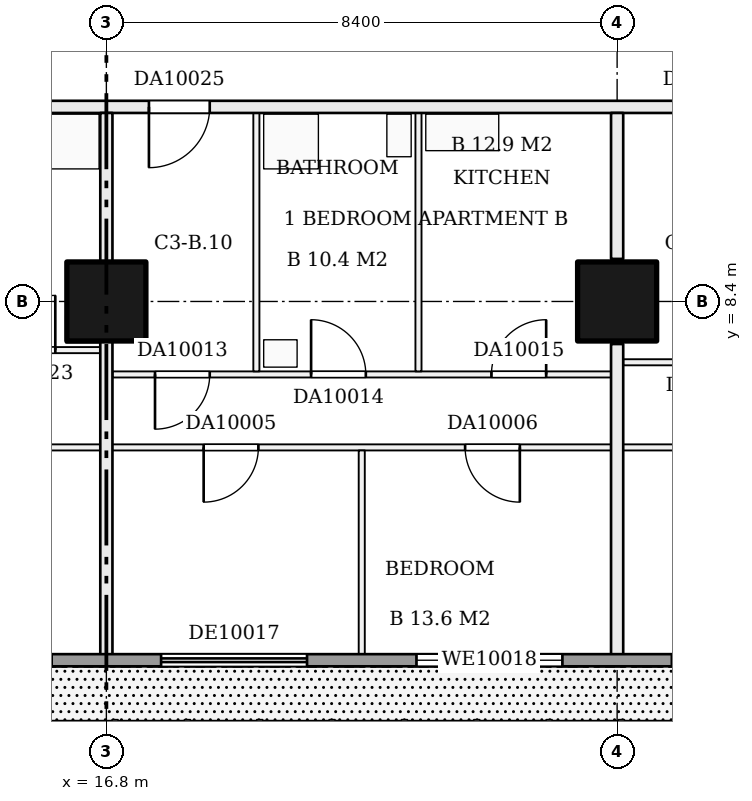
"""IFC4 building model, lengths in metres.
Left out: names, types, materials, properties, quantities, classifications, styles, units other than length and angle.
Written with IfcOpenShell. Run it as: python <this file> out.ifc"""

import sys

from ifc_helpers import new_model, si_unit, direction, frame, frame_2d, origin, origin_2d, place, context, subcontext, project, spatial, rectangle, extrude, element, fill, save


model = new_model("IFC4")
c1 = context("Model", 3, precision=1e-05, world=origin(), true_north=direction((0.0, 1.0)))
c2 = subcontext(c1, "Body", "Model", "MODEL_VIEW")
j1 = project(units=[si_unit("LENGTHUNIT", "METRE"), si_unit("PLANEANGLEUNIT", "RADIAN")], contexts=[c1])
p1 = place(None, origin())
s1 = spatial("IfcSite", under=j1, at=p1, CompositionType="ELEMENT")
p2 = place(p1, origin())
s2 = spatial("IfcBuilding", under=s1, at=p2, CompositionType="ELEMENT")
p3 = place(p2, frame((0.0, 0.0, 46.2)))
s3 = spatial("IfcBuildingStorey", under=s2, at=p3, CompositionType="ELEMENT", Elevation=46.2)
for number, where, z_axis, x_axis in (
    (1, (16.8, 8.4, 0.0), (0.0, 0.0, 1.0), (1.0, 0.0, 0.0)),
    (2, (25.2, 8.4, 0.0), (0.0, 0.0, 1.0), (1.0, 0.0, 0.0)),
):
    element("IfcColumn", number, at=place(p3, frame(where, z_axis=z_axis, x_axis=x_axis)), inside=s3, PredefinedType="COLUMN", context=c2, shape_type="SweptSolid", body=[
        extrude(rectangle(XDim=1.3, YDim=1.3, at=origin_2d()), origin(), (0.0, 0.0, 1.0), 3.22),
    ])
p4 = place(p3, frame((12.65, 6.0, 0.0), z_axis=(0.0, 0.0, 1.0), x_axis=(1.0, 0.0, 0.0)))
e3 = element("IfcWall", 3, at=p4, inside=s3, PredefinedType="PARTITIONING", context=c2, shape_type="SweptSolid", body=[
    extrude(rectangle(XDim=25.05, YDim=0.1, at=frame_2d((12.525, 0.0))), origin(), (0.0, 0.0, 1.0), 3.22),
])
p5 = place(p4, frame((1.65, 0.0, 0.0)))
e4 = element("IfcOpeningElement", 4, at=p5, cuts=e3, PredefinedType="OPENING", context=c2, shape_type="SweptSolid", body=[
    extrude(rectangle(XDim=0.9, YDim=2.1, at=frame_2d((0.45, 1.05))), frame((0.0, 0.06, 0.0), z_axis=(0.0, -1.0, 0.0), x_axis=(1.0, 0.0, 0.0)), (0.0, 0.0, 1.0), 0.12),
])
p6 = place(p4, frame((5.75, 0.0, 0.0)))
e5 = element("IfcOpeningElement", 5, at=p6, cuts=e3, PredefinedType="OPENING", context=c2, shape_type="SweptSolid", body=[
    extrude(rectangle(XDim=0.9, YDim=2.1, at=frame_2d((0.45, 1.05))), frame((0.0, 0.06, 0.0), z_axis=(0.0, -1.0, 0.0), x_axis=(1.0, 0.0, 0.0)), (0.0, 0.0, 1.0), 0.12),
])
p7 = place(p4, frame((10.05, 0.0, 0.0)))
e6 = element("IfcOpeningElement", 6, at=p7, cuts=e3, PredefinedType="OPENING", context=c2, shape_type="SweptSolid", body=[
    extrude(rectangle(XDim=0.9, YDim=2.1, at=frame_2d((0.45, 1.05))), frame((0.0, 0.06, 0.0), z_axis=(0.0, -1.0, 0.0), x_axis=(1.0, 0.0, 0.0)), (0.0, 0.0, 1.0), 0.12),
])
p8 = place(p4, frame((14.15, 0.0, 0.0)))
e7 = element("IfcOpeningElement", 7, at=p8, cuts=e3, PredefinedType="OPENING", context=c2, shape_type="SweptSolid", body=[
    extrude(rectangle(XDim=0.9, YDim=2.1, at=frame_2d((0.45, 1.05))), frame((0.0, 0.06, 0.0), z_axis=(0.0, -1.0, 0.0), x_axis=(1.0, 0.0, 0.0)), (0.0, 0.0, 1.0), 0.12),
])
p9 = place(p4, frame((20.45, 0.0, 0.0)))
e8 = element("IfcOpeningElement", 8, at=p9, cuts=e3, PredefinedType="OPENING", context=c2, shape_type="SweptSolid", body=[
    extrude(rectangle(XDim=0.9, YDim=2.1, at=frame_2d((0.45, 1.05))), frame((0.0, 0.06, 0.0), z_axis=(0.0, -1.0, 0.0), x_axis=(1.0, 0.0, 0.0)), (0.0, 0.0, 1.0), 0.12),
])
p10 = place(p3, frame((16.9, 7.2, 0.0), z_axis=(0.0, 0.0, 1.0), x_axis=(1.0, 0.0, 0.0)))
e9 = element("IfcWall", 9, at=p10, inside=s3, PredefinedType="PARTITIONING", context=c2, shape_type="SweptSolid", body=[
    extrude(rectangle(XDim=8.2, YDim=0.1, at=frame_2d((4.1, 0.0))), origin(), (0.0, 0.0, 1.0), 3.22),
])
p11 = place(p10, frame((0.7, 0.0, 0.0)))
e10 = element("IfcOpeningElement", 10, at=p11, cuts=e9, PredefinedType="OPENING", context=c2, shape_type="SweptSolid", body=[
    extrude(rectangle(XDim=0.9, YDim=2.1, at=frame_2d((0.45, 1.05))), frame((0.0, 0.06, 0.0), z_axis=(0.0, -1.0, 0.0), x_axis=(1.0, 0.0, 0.0)), (0.0, 0.0, 1.0), 0.12),
])
p12 = place(p10, frame((3.267, 0.0, 0.0)))
e11 = element("IfcOpeningElement", 11, at=p12, cuts=e9, PredefinedType="OPENING", context=c2, shape_type="SweptSolid", body=[
    extrude(rectangle(XDim=0.9, YDim=2.1, at=frame_2d((0.45, 1.05))), frame((0.0, 0.06, 0.0), z_axis=(0.0, -1.0, 0.0), x_axis=(1.0, 0.0, 0.0)), (0.0, 0.0, 1.0), 0.12),
])
p13 = place(p10, frame((6.233, 0.0, 0.0)))
e12 = element("IfcOpeningElement", 12, at=p13, cuts=e9, PredefinedType="OPENING", context=c2, shape_type="SweptSolid", body=[
    extrude(rectangle(XDim=0.9, YDim=2.1, at=frame_2d((0.45, 1.05))), frame((0.0, 0.06, 0.0), z_axis=(0.0, -1.0, 0.0), x_axis=(1.0, 0.0, 0.0)), (0.0, 0.0, 1.0), 0.12),
])
p14 = place(p3, frame((25.3, 7.4, 0.0), z_axis=(0.0, 0.0, 1.0), x_axis=(1.0, 0.0, 0.0)))
e13 = element("IfcWall", 13, at=p14, inside=s3, PredefinedType="PARTITIONING", context=c2, shape_type="SweptSolid", body=[
    extrude(rectangle(XDim=12.4, YDim=0.1, at=frame_2d((6.2, 0.0))), origin(), (0.0, 0.0, 1.0), 3.22),
])
p15 = place(p14, frame((1.0, 0.0, 0.0)))
e14 = element("IfcOpeningElement", 14, at=p15, cuts=e13, PredefinedType="OPENING", context=c2, shape_type="SweptSolid", body=[
    extrude(rectangle(XDim=0.9, YDim=2.1, at=frame_2d((0.45, 1.05))), frame((0.0, 0.06, 0.0), z_axis=(0.0, -1.0, 0.0), x_axis=(1.0, 0.0, 0.0)), (0.0, 0.0, 1.0), 0.12),
])
p16 = place(p14, frame((3.8, 0.0, 0.0)))
e15 = element("IfcOpeningElement", 15, at=p16, cuts=e13, PredefinedType="OPENING", context=c2, shape_type="SweptSolid", body=[
    extrude(rectangle(XDim=0.9, YDim=2.1, at=frame_2d((0.45, 1.05))), frame((0.0, 0.06, 0.0), z_axis=(0.0, -1.0, 0.0), x_axis=(1.0, 0.0, 0.0)), (0.0, 0.0, 1.0), 0.12),
])
p17 = place(p14, frame((6.5, 0.0, 0.0)))
e16 = element("IfcOpeningElement", 16, at=p17, cuts=e13, PredefinedType="OPENING", context=c2, shape_type="SweptSolid", body=[
    extrude(rectangle(XDim=0.9, YDim=2.1, at=frame_2d((0.45, 1.05))), frame((0.0, 0.06, 0.0), z_axis=(0.0, -1.0, 0.0), x_axis=(1.0, 0.0, 0.0)), (0.0, 0.0, 1.0), 0.12),
])
p18 = place(p14, frame((10.4, 0.0, 0.0)))
e17 = element("IfcOpeningElement", 17, at=p18, cuts=e13, PredefinedType="OPENING", context=c2, shape_type="SweptSolid", body=[
    extrude(rectangle(XDim=0.9, YDim=2.1, at=frame_2d((0.45, 1.05))), frame((0.0, 0.06, 0.0), z_axis=(0.0, -1.0, 0.0), x_axis=(1.0, 0.0, 0.0)), (0.0, 0.0, 1.0), 0.12),
])
p19 = place(p3, frame((12.65, 7.6, 0.0), z_axis=(0.0, 0.0, 1.0), x_axis=(1.0, 0.0, 0.0)))
e18 = element("IfcWall", 18, at=p19, inside=s3, PredefinedType="PARTITIONING", context=c2, shape_type="SweptSolid", body=[
    extrude(rectangle(XDim=4.05, YDim=0.1, at=frame_2d((2.025, 0.0))), origin(), (0.0, 0.0, 1.0), 3.22),
])
p20 = place(p19, frame((0.45, 0.0, 0.0)))
e19 = element("IfcOpeningElement", 19, at=p20, cuts=e18, PredefinedType="OPENING", context=c2, shape_type="SweptSolid", body=[
    extrude(rectangle(XDim=0.9, YDim=2.1, at=frame_2d((0.45, 1.05))), frame((0.0, 0.06, 0.0), z_axis=(0.0, -1.0, 0.0), x_axis=(1.0, 0.0, 0.0)), (0.0, 0.0, 1.0), 0.12),
])
p21 = place(p19, frame((2.41, 0.0, 0.0)))
e20 = element("IfcOpeningElement", 20, at=p21, cuts=e18, PredefinedType="OPENING", context=c2, shape_type="SweptSolid", body=[
    extrude(rectangle(XDim=0.9, YDim=2.1, at=frame_2d((0.45, 1.05))), frame((0.0, 0.06, 0.0), z_axis=(0.0, -1.0, 0.0), x_axis=(1.0, 0.0, 0.0)), (0.0, 0.0, 1.0), 0.12),
])
p22 = place(p3, frame((11.5, 11.6, 0.0), z_axis=(0.0, 0.0, 1.0), x_axis=(1.0, 0.0, 0.0)))
e21 = element("IfcWall", 21, at=p22, inside=s3, PredefinedType="PARTITIONING", context=c2, shape_type="SweptSolid", body=[
    extrude(rectangle(XDim=30.5, YDim=0.2, at=frame_2d((15.25, 0.0))), origin(), (0.0, 0.0, 1.0), 3.22),
])
p23 = place(p22, frame((1.6, 0.0, 0.0)))
e22 = element("IfcOpeningElement", 22, at=p23, cuts=e21, PredefinedType="OPENING", context=c2, shape_type="SweptSolid", body=[
    extrude(rectangle(XDim=1.0, YDim=2.1, at=frame_2d((0.5, 1.05))), frame((0.0, 0.11, 0.0), z_axis=(0.0, -1.0, 0.0), x_axis=(1.0, 0.0, 0.0)), (0.0, 0.0, 1.0), 0.22),
])
p24 = place(p22, frame((6.0, 0.0, 0.0)))
e23 = element("IfcOpeningElement", 23, at=p24, cuts=e21, PredefinedType="OPENING", context=c2, shape_type="SweptSolid", body=[
    extrude(rectangle(XDim=1.0, YDim=2.1, at=frame_2d((0.5, 1.05))), frame((0.0, 0.11, 0.0), z_axis=(0.0, -1.0, 0.0), x_axis=(1.0, 0.0, 0.0)), (0.0, 0.0, 1.0), 0.22),
])
p25 = place(p22, frame((14.7, 0.0, 0.0)))
e24 = element("IfcOpeningElement", 24, at=p25, cuts=e21, PredefinedType="OPENING", context=c2, shape_type="SweptSolid", body=[
    extrude(rectangle(XDim=1.0, YDim=2.1, at=frame_2d((0.5, 1.05))), frame((0.0, 0.11, 0.0), z_axis=(0.0, -1.0, 0.0), x_axis=(1.0, 0.0, 0.0)), (0.0, 0.0, 1.0), 0.22),
])
p26 = place(p22, frame((29.04, 0.0, 0.0)))
e25 = element("IfcOpeningElement", 25, at=p26, cuts=e21, PredefinedType="OPENING", context=c2, shape_type="SweptSolid", body=[
    extrude(rectangle(XDim=1.0, YDim=2.1, at=frame_2d((0.5, 1.05))), frame((0.0, 0.11, 0.0), z_axis=(0.0, -1.0, 0.0), x_axis=(1.0, 0.0, 0.0)), (0.0, 0.0, 1.0), 0.22),
])
p27 = place(p3, frame((16.8, 2.5, 0.0), z_axis=(0.0, 0.0, 1.0), x_axis=(0.0, 1.0, 0.0)))
e26 = element("IfcWall", 26, at=p27, inside=s3, PredefinedType="PARTITIONING", context=c2, shape_type="SweptSolid", body=[
    extrude(rectangle(XDim=9.0, YDim=0.2, at=frame_2d((4.5, 0.0))), origin(), (0.0, 0.0, 1.0), 3.22),
])
p28 = place(p3, frame((19.267, 7.25, 0.0), z_axis=(0.0, 0.0, 1.0), x_axis=(0.0, 1.0, 0.0)))
e27 = element("IfcWall", 27, at=p28, inside=s3, PredefinedType="PARTITIONING", context=c2, shape_type="SweptSolid", body=[
    extrude(rectangle(XDim=4.25, YDim=0.1, at=frame_2d((2.125, 0.0))), origin(), (0.0, 0.0, 1.0), 3.22),
])
p29 = place(p3, frame((21.0, 2.5, 0.0), z_axis=(0.0, 0.0, 1.0), x_axis=(0.0, 1.0, 0.0)))
e28 = element("IfcWall", 28, at=p29, inside=s3, PredefinedType="PARTITIONING", context=c2, shape_type="SweptSolid", body=[
    extrude(rectangle(XDim=3.45, YDim=0.1, at=frame_2d((1.725, 0.0))), origin(), (0.0, 0.0, 1.0), 3.22),
])
p30 = place(p3, frame((21.933, 7.25, 0.0), z_axis=(0.0, 0.0, 1.0), x_axis=(0.0, 1.0, 0.0)))
e29 = element("IfcWall", 29, at=p30, inside=s3, PredefinedType="PARTITIONING", context=c2, shape_type="SweptSolid", body=[
    extrude(rectangle(XDim=4.25, YDim=0.1, at=frame_2d((2.125, 0.0))), origin(), (0.0, 0.0, 1.0), 3.22),
])
p31 = place(p3, frame((25.2, 2.5, 0.0), z_axis=(0.0, 0.0, 1.0), x_axis=(0.0, 1.0, 0.0)))
e30 = element("IfcWall", 30, at=p31, inside=s3, PredefinedType="PARTITIONING", context=c2, shape_type="SweptSolid", body=[
    extrude(rectangle(XDim=5.2, YDim=0.2, at=frame_2d((2.6, 0.0))), origin(), (0.0, 0.0, 1.0), 3.22),
])
p32 = place(p3, frame((25.2, 9.1, 0.0), z_axis=(0.0, 0.0, 1.0), x_axis=(0.0, 1.0, 0.0)))
e31 = element("IfcWall", 31, at=p32, inside=s3, PredefinedType="PARTITIONING", context=c2, shape_type="SweptSolid", body=[
    extrude(rectangle(XDim=2.4, YDim=0.2, at=frame_2d((1.2, 0.0))), origin(), (0.0, 0.0, 1.0), 3.22),
])
p33 = place(p3, frame((4.8, 2.5, 0.0), z_axis=(0.0, 0.0, 1.0), x_axis=(1.0, 0.0, 0.0)))
e32 = element("IfcWall", 32, at=p33, inside=s3, PredefinedType="SOLIDWALL", context=c2, shape_type="SweptSolid", body=[
    extrude(rectangle(XDim=57.6, YDim=0.2, at=frame_2d((28.8, 0.0))), origin(), (0.0, 0.0, 1.0), 3.22),
])
p34 = place(p33, frame((0.3, 0.0, 0.0)))
e33 = element("IfcOpeningElement", 33, at=p34, cuts=e32, PredefinedType="OPENING", context=c2, shape_type="SweptSolid", body=[
    extrude(rectangle(XDim=2.4, YDim=2.2, at=frame_2d((1.2, 1.1))), frame((0.0, 0.11, 0.0), z_axis=(0.0, -1.0, 0.0), x_axis=(1.0, 0.0, 0.0)), (0.0, 0.0, 1.0), 0.22),
])
p35 = place(p33, frame((4.5, 0.0, 0.9)))
e34 = element("IfcOpeningElement", 34, at=p35, cuts=e32, PredefinedType="OPENING", context=c2, shape_type="SweptSolid", body=[
    extrude(rectangle(XDim=2.4, YDim=1.5, at=frame_2d((1.2, 0.75))), frame((0.0, 0.11, 0.0), z_axis=(0.0, -1.0, 0.0), x_axis=(1.0, 0.0, 0.0)), (0.0, 0.0, 1.0), 0.22),
])
p36 = place(p33, frame((8.7, 0.0, 0.9)))
e35 = element("IfcOpeningElement", 35, at=p36, cuts=e32, PredefinedType="OPENING", context=c2, shape_type="SweptSolid", body=[
    extrude(rectangle(XDim=2.4, YDim=1.5, at=frame_2d((1.2, 0.75))), frame((0.0, 0.11, 0.0), z_axis=(0.0, -1.0, 0.0), x_axis=(1.0, 0.0, 0.0)), (0.0, 0.0, 1.0), 0.22),
])
p37 = place(p33, frame((12.9, 0.0, 0.0)))
e36 = element("IfcOpeningElement", 36, at=p37, cuts=e32, PredefinedType="OPENING", context=c2, shape_type="SweptSolid", body=[
    extrude(rectangle(XDim=2.4, YDim=2.2, at=frame_2d((1.2, 1.1))), frame((0.0, 0.11, 0.0), z_axis=(0.0, -1.0, 0.0), x_axis=(1.0, 0.0, 0.0)), (0.0, 0.0, 1.0), 0.22),
])
p38 = place(p33, frame((17.1, 0.0, 0.9)))
e37 = element("IfcOpeningElement", 37, at=p38, cuts=e32, PredefinedType="OPENING", context=c2, shape_type="SweptSolid", body=[
    extrude(rectangle(XDim=2.4, YDim=1.5, at=frame_2d((1.2, 0.75))), frame((0.0, 0.11, 0.0), z_axis=(0.0, -1.0, 0.0), x_axis=(1.0, 0.0, 0.0)), (0.0, 0.0, 1.0), 0.22),
])
p39 = place(p33, frame((21.3, 0.0, 0.9)))
e38 = element("IfcOpeningElement", 38, at=p39, cuts=e32, PredefinedType="OPENING", context=c2, shape_type="SweptSolid", body=[
    extrude(rectangle(XDim=2.4, YDim=1.5, at=frame_2d((1.2, 0.75))), frame((0.0, 0.11, 0.0), z_axis=(0.0, -1.0, 0.0), x_axis=(1.0, 0.0, 0.0)), (0.0, 0.0, 1.0), 0.22),
])
p40 = place(p33, frame((25.5, 0.0, 0.0)))
e39 = element("IfcOpeningElement", 39, at=p40, cuts=e32, PredefinedType="OPENING", context=c2, shape_type="SweptSolid", body=[
    extrude(rectangle(XDim=2.4, YDim=2.2, at=frame_2d((1.2, 1.1))), frame((0.0, 0.11, 0.0), z_axis=(0.0, -1.0, 0.0), x_axis=(1.0, 0.0, 0.0)), (0.0, 0.0, 1.0), 0.22),
])
p41 = place(p33, frame((29.7, 0.0, 0.0)))
e40 = element("IfcOpeningElement", 40, at=p41, cuts=e32, PredefinedType="OPENING", context=c2, shape_type="SweptSolid", body=[
    extrude(rectangle(XDim=2.4, YDim=2.2, at=frame_2d((1.2, 1.1))), frame((0.0, 0.11, 0.0), z_axis=(0.0, -1.0, 0.0), x_axis=(1.0, 0.0, 0.0)), (0.0, 0.0, 1.0), 0.22),
])
p42 = place(p33, frame((33.9, 0.0, 0.0)))
e41 = element("IfcOpeningElement", 41, at=p42, cuts=e32, PredefinedType="OPENING", context=c2, shape_type="SweptSolid", body=[
    extrude(rectangle(XDim=2.4, YDim=2.2, at=frame_2d((1.2, 1.1))), frame((0.0, 0.11, 0.0), z_axis=(0.0, -1.0, 0.0), x_axis=(1.0, 0.0, 0.0)), (0.0, 0.0, 1.0), 0.22),
])
p43 = place(p33, frame((38.1, 0.0, 0.9)))
e42 = element("IfcOpeningElement", 42, at=p43, cuts=e32, PredefinedType="OPENING", context=c2, shape_type="SweptSolid", body=[
    extrude(rectangle(XDim=2.4, YDim=1.5, at=frame_2d((1.2, 0.75))), frame((0.0, 0.11, 0.0), z_axis=(0.0, -1.0, 0.0), x_axis=(1.0, 0.0, 0.0)), (0.0, 0.0, 1.0), 0.22),
])
p44 = place(p33, frame((42.3, 0.0, 0.9)))
e43 = element("IfcOpeningElement", 43, at=p44, cuts=e32, PredefinedType="OPENING", context=c2, shape_type="SweptSolid", body=[
    extrude(rectangle(XDim=2.4, YDim=1.5, at=frame_2d((1.2, 0.75))), frame((0.0, 0.11, 0.0), z_axis=(0.0, -1.0, 0.0), x_axis=(1.0, 0.0, 0.0)), (0.0, 0.0, 1.0), 0.22),
])
p45 = place(p33, frame((46.5, 0.0, 0.0)))
e44 = element("IfcOpeningElement", 44, at=p45, cuts=e32, PredefinedType="OPENING", context=c2, shape_type="SweptSolid", body=[
    extrude(rectangle(XDim=2.4, YDim=2.2, at=frame_2d((1.2, 1.1))), frame((0.0, 0.11, 0.0), z_axis=(0.0, -1.0, 0.0), x_axis=(1.0, 0.0, 0.0)), (0.0, 0.0, 1.0), 0.22),
])
p46 = place(p33, frame((50.7, 0.0, 0.9)))
e45 = element("IfcOpeningElement", 45, at=p46, cuts=e32, PredefinedType="OPENING", context=c2, shape_type="SweptSolid", body=[
    extrude(rectangle(XDim=2.4, YDim=1.5, at=frame_2d((1.2, 0.75))), frame((0.0, 0.11, 0.0), z_axis=(0.0, -1.0, 0.0), x_axis=(1.0, 0.0, 0.0)), (0.0, 0.0, 1.0), 0.22),
])
p47 = place(p33, frame((54.9, 0.0, 0.9)))
e46 = element("IfcOpeningElement", 46, at=p47, cuts=e32, PredefinedType="OPENING", context=c2, shape_type="SweptSolid", body=[
    extrude(rectangle(XDim=2.4, YDim=1.5, at=frame_2d((1.2, 0.75))), frame((0.0, 0.11, 0.0), z_axis=(0.0, -1.0, 0.0), x_axis=(1.0, 0.0, 0.0)), (0.0, 0.0, 1.0), 0.22),
])
p48 = place(p6, frame((0.9, 0.0, 0.0), z_axis=(0.0, 0.0, 1.0), x_axis=(-1.0, 0.0, 0.0)))
e47 = element("IfcDoor", 47, at=p48, inside=s3, OperationType="SINGLE_SWING_RIGHT", PredefinedType="DOOR", context=c2, shape_type="SweptSolid", body=[
    extrude(rectangle(XDim=0.9, YDim=2.1, at=frame_2d((0.45, 1.05))), frame((0.0, 0.025, 0.0), z_axis=(0.0, -1.0, 0.0), x_axis=(1.0, 0.0, 0.0)), (0.0, 0.0, 1.0), 0.05),
])
fill(e5, e47)
p49 = place(p7, frame((0.9, 0.0, 0.0), z_axis=(0.0, 0.0, 1.0), x_axis=(-1.0, 0.0, 0.0)))
e48 = element("IfcDoor", 48, at=p49, inside=s3, OperationType="SINGLE_SWING_LEFT", PredefinedType="DOOR", context=c2, shape_type="SweptSolid", body=[
    extrude(rectangle(XDim=0.9, YDim=2.1, at=frame_2d((0.45, 1.05))), frame((0.0, 0.025, 0.0), z_axis=(0.0, -1.0, 0.0), x_axis=(1.0, 0.0, 0.0)), (0.0, 0.0, 1.0), 0.05),
])
fill(e6, e48)
p50 = place(p11, frame((0.9, 0.0, 0.0), z_axis=(0.0, 0.0, 1.0), x_axis=(-1.0, 0.0, 0.0)))
e49 = element("IfcDoor", 49, at=p50, inside=s3, OperationType="SINGLE_SWING_RIGHT", PredefinedType="DOOR", context=c2, shape_type="SweptSolid", body=[
    extrude(rectangle(XDim=0.9, YDim=2.1, at=frame_2d((0.45, 1.05))), frame((0.0, 0.025, 0.0), z_axis=(0.0, -1.0, 0.0), x_axis=(1.0, 0.0, 0.0)), (0.0, 0.0, 1.0), 0.05),
])
fill(e10, e49)
p51 = place(p12, origin())
e50 = element("IfcDoor", 50, at=p51, inside=s3, OperationType="SINGLE_SWING_LEFT", PredefinedType="DOOR", context=c2, shape_type="SweptSolid", body=[
    extrude(rectangle(XDim=0.9, YDim=2.1, at=frame_2d((0.45, 1.05))), frame((0.0, 0.025, 0.0), z_axis=(0.0, -1.0, 0.0), x_axis=(1.0, 0.0, 0.0)), (0.0, 0.0, 1.0), 0.05),
])
fill(e11, e50)
p52 = place(p13, origin())
e51 = element("IfcDoor", 51, at=p52, inside=s3, OperationType="SINGLE_SWING_RIGHT", PredefinedType="DOOR", context=c2, shape_type="SweptSolid", body=[
    extrude(rectangle(XDim=0.9, YDim=2.1, at=frame_2d((0.45, 1.05))), frame((0.0, 0.025, 0.0), z_axis=(0.0, -1.0, 0.0), x_axis=(1.0, 0.0, 0.0)), (0.0, 0.0, 1.0), 0.05),
])
fill(e12, e51)
p53 = place(p21, origin())
e52 = element("IfcDoor", 52, at=p53, inside=s3, OperationType="SINGLE_SWING_RIGHT", PredefinedType="DOOR", context=c2, shape_type="SweptSolid", body=[
    extrude(rectangle(XDim=0.9, YDim=2.1, at=frame_2d((0.45, 1.05))), frame((0.0, 0.025, 0.0), z_axis=(0.0, -1.0, 0.0), x_axis=(1.0, 0.0, 0.0)), (0.0, 0.0, 1.0), 0.05),
])
fill(e20, e52)
p54 = place(p24, frame((1.0, 0.0, 0.0), z_axis=(0.0, 0.0, 1.0), x_axis=(-1.0, 0.0, 0.0)))
e53 = element("IfcDoor", 53, at=p54, inside=s3, OperationType="SINGLE_SWING_RIGHT", PredefinedType="DOOR", context=c2, shape_type="SweptSolid", body=[
    extrude(rectangle(XDim=1.0, YDim=2.1, at=frame_2d((0.5, 1.05))), frame((0.0, 0.025, 0.0), z_axis=(0.0, -1.0, 0.0), x_axis=(1.0, 0.0, 0.0)), (0.0, 0.0, 1.0), 0.05),
])
fill(e23, e53)
p55 = place(p37, origin())
e54 = element("IfcDoor", 54, at=p55, inside=s3, OperationType="DOUBLE_DOOR_SLIDING", PredefinedType="DOOR", context=c2, shape_type="SweptSolid", body=[
    extrude(rectangle(XDim=2.4, YDim=2.2, at=frame_2d((1.2, 1.1))), frame((0.0, 0.025, 0.0), z_axis=(0.0, -1.0, 0.0), x_axis=(1.0, 0.0, 0.0)), (0.0, 0.0, 1.0), 0.05),
])
fill(e36, e54)
p56 = place(p38, origin())
e55 = element("IfcWindow", 55, at=p56, inside=s3, PartitioningType="SINGLE_PANEL", PredefinedType="WINDOW", context=c2, shape_type="SweptSolid", body=[
    extrude(rectangle(XDim=2.4, YDim=1.5, at=frame_2d((1.2, 0.75))), frame((0.0, 0.03, 0.0), z_axis=(0.0, -1.0, 0.0), x_axis=(1.0, 0.0, 0.0)), (0.0, 0.0, 1.0), 0.06),
])
fill(e37, e55)
save(model, sys.argv[1])
